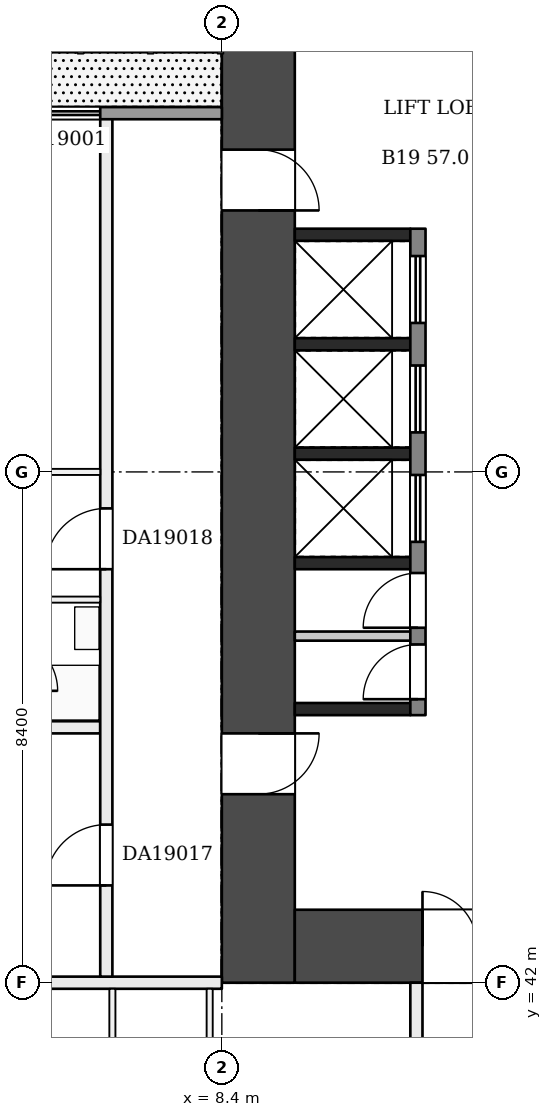
"""IFC4 building model, lengths in metres.
Left out: names, types, materials, properties, quantities, classifications, styles, units other than length and angle.
Written with IfcOpenShell. Run it as: python <this file> out.ifc"""

import sys

from ifc_helpers import new_model, si_unit, direction, frame, frame_2d, origin, place, context, subcontext, project, spatial, rectangle, extrude, element, fill, save


model = new_model("IFC4")
c1 = context("Model", 3, precision=1e-05, world=origin(), true_north=direction((0.0, 1.0)))
c2 = subcontext(c1, "Body", "Model", "MODEL_VIEW")
j1 = project(units=[si_unit("LENGTHUNIT", "METRE"), si_unit("PLANEANGLEUNIT", "RADIAN")], contexts=[c1])
p1 = place(None, origin())
s1 = spatial("IfcSite", under=j1, at=p1, CompositionType="ELEMENT")
p2 = place(p1, origin())
s2 = spatial("IfcBuilding", under=s1, at=p2, CompositionType="ELEMENT")
p3 = place(p2, frame((0.0, 0.0, 81.2)))
s3 = spatial("IfcBuildingStorey", under=s2, at=p3, CompositionType="ELEMENT", Elevation=81.2)
p4 = place(p3, frame((9.0, 58.8, 0.0), z_axis=(0.0, 0.0, 1.0), x_axis=(0.0, -1.0, 0.0)))
e1 = element("IfcWall", 1, at=p4, inside=s3, PredefinedType="SHEAR", context=c2, shape_type="SweptSolid", body=[
    extrude(rectangle(XDim=16.8, YDim=1.2, at=frame_2d((8.4, 0.0))), origin(), (0.0, 0.0, 1.0), 3.22),
])
p5 = place(p4, frame((3.1, 0.0, 0.0)))
e2 = element("IfcOpeningElement", 2, at=p5, cuts=e1, PredefinedType="OPENING", context=c2, shape_type="SweptSolid", body=[
    extrude(rectangle(XDim=1.0, YDim=2.1, at=frame_2d((0.5, 1.05))), frame((0.0, 0.61, 0.0), z_axis=(0.0, -1.0, 0.0), x_axis=(1.0, 0.0, 0.0)), (0.0, 0.0, 1.0), 1.22),
])
p6 = place(p4, frame((12.7, 0.0, 0.0)))
e3 = element("IfcOpeningElement", 3, at=p6, cuts=e1, PredefinedType="OPENING", context=c2, shape_type="SweptSolid", body=[
    extrude(rectangle(XDim=1.0, YDim=2.1, at=frame_2d((0.5, 1.05))), frame((0.0, 0.61, 0.0), z_axis=(0.0, -1.0, 0.0), x_axis=(1.0, 0.0, 0.0)), (0.0, 0.0, 1.0), 1.22),
])
p7 = place(p3, frame((9.6, 42.6, 0.0), z_axis=(0.0, 0.0, 1.0), x_axis=(1.0, 0.0, 0.0)))
e4 = element("IfcWall", 4, at=p7, inside=s3, PredefinedType="SHEAR", context=c2, shape_type="SweptSolid", body=[
    extrude(rectangle(XDim=14.4, YDim=1.2, at=frame_2d((7.2, 0.0))), origin(), (0.0, 0.0, 1.0), 3.22),
])
p8 = place(p7, frame((2.1, 0.0, 0.0)))
e5 = element("IfcOpeningElement", 5, at=p8, cuts=e4, PredefinedType="OPENING", context=c2, shape_type="SweptSolid", body=[
    extrude(rectangle(XDim=1.8, YDim=2.1, at=frame_2d((0.9, 1.05))), frame((0.0, 0.61, 0.0), z_axis=(0.0, -1.0, 0.0), x_axis=(1.0, 0.0, 0.0)), (0.0, 0.0, 1.0), 1.22),
])
for number, where, z_axis, x_axis in (
    (6, (9.6, 54.3, 0.0), (0.0, 0.0, 1.0), (1.0, 0.0, 0.0)),
    (7, (9.6, 52.5, 0.0), (0.0, 0.0, 1.0), (1.0, 0.0, 0.0)),
    (8, (9.6, 50.7, 0.0), (0.0, 0.0, 1.0), (1.0, 0.0, 0.0)),
    (9, (9.6, 48.9, 0.0), (0.0, 0.0, 1.0), (1.0, 0.0, 0.0)),
    (10, (9.6, 46.5, 0.0), (0.0, 0.0, 1.0), (1.0, 0.0, 0.0)),
):
    element("IfcWall", number, at=place(p3, frame(where, z_axis=z_axis, x_axis=x_axis)), inside=s3, PredefinedType="SHEAR", context=c2, shape_type="SweptSolid", body=[
        extrude(rectangle(XDim=1.9, YDim=0.2, at=frame_2d((0.95, 0.0))), origin(), (0.0, 0.0, 1.0), 3.22),
    ])
p9 = place(p3, frame((9.6, 47.7, 0.0), z_axis=(0.0, 0.0, 1.0), x_axis=(1.0, 0.0, 0.0)))
e11 = element("IfcWall", 11, at=p9, inside=s3, PredefinedType="PARTITIONING", context=c2, shape_type="SweptSolid", body=[
    extrude(rectangle(XDim=1.9, YDim=0.15, at=frame_2d((0.95, 0.0))), origin(), (0.0, 0.0, 1.0), 3.22),
])
p10 = place(p3, frame((11.625, 54.4, 0.0), z_axis=(0.0, 0.0, 1.0), x_axis=(0.0, -1.0, 0.0)))
e12 = element("IfcWall", 12, at=p10, inside=s3, PredefinedType="SHEAR", context=c2, shape_type="SweptSolid", body=[
    extrude(rectangle(XDim=8.0, YDim=0.25, at=frame_2d((4.0, 0.0))), origin(), (0.0, 0.0, 1.0), 3.22),
])
p11 = place(p10, frame((0.45, 0.0, 0.0)))
e13 = element("IfcOpeningElement", 13, at=p11, cuts=e12, PredefinedType="OPENING", context=c2, shape_type="SweptSolid", body=[
    extrude(rectangle(XDim=1.1, YDim=2.1, at=frame_2d((0.55, 1.05))), frame((0.0, 0.135, 0.0), z_axis=(0.0, -1.0, 0.0), x_axis=(1.0, 0.0, 0.0)), (0.0, 0.0, 1.0), 0.27),
])
p12 = place(p10, frame((2.25, 0.0, 0.0)))
e14 = element("IfcOpeningElement", 14, at=p12, cuts=e12, PredefinedType="OPENING", context=c2, shape_type="SweptSolid", body=[
    extrude(rectangle(XDim=1.1, YDim=2.1, at=frame_2d((0.55, 1.05))), frame((0.0, 0.135, 0.0), z_axis=(0.0, -1.0, 0.0), x_axis=(1.0, 0.0, 0.0)), (0.0, 0.0, 1.0), 0.27),
])
p13 = place(p10, frame((4.05, 0.0, 0.0)))
e15 = element("IfcOpeningElement", 15, at=p13, cuts=e12, PredefinedType="OPENING", context=c2, shape_type="SweptSolid", body=[
    extrude(rectangle(XDim=1.1, YDim=2.1, at=frame_2d((0.55, 1.05))), frame((0.0, 0.135, 0.0), z_axis=(0.0, -1.0, 0.0), x_axis=(1.0, 0.0, 0.0)), (0.0, 0.0, 1.0), 0.27),
])
p14 = place(p10, frame((5.663, 0.0, 0.0)))
e16 = element("IfcOpeningElement", 16, at=p14, cuts=e12, PredefinedType="OPENING", context=c2, shape_type="SweptSolid", body=[
    extrude(rectangle(XDim=0.9, YDim=2.1, at=frame_2d((0.45, 1.05))), frame((0.0, 0.135, 0.0), z_axis=(0.0, -1.0, 0.0), x_axis=(1.0, 0.0, 0.0)), (0.0, 0.0, 1.0), 0.27),
])
p15 = place(p10, frame((6.837, 0.0, 0.0)))
e17 = element("IfcOpeningElement", 17, at=p15, cuts=e12, PredefinedType="OPENING", context=c2, shape_type="SweptSolid", body=[
    extrude(rectangle(XDim=0.9, YDim=2.1, at=frame_2d((0.45, 1.05))), frame((0.0, 0.135, 0.0), z_axis=(0.0, -1.0, 0.0), x_axis=(1.0, 0.0, 0.0)), (0.0, 0.0, 1.0), 0.27),
])
p16 = place(p3, frame((2.5, 42.0, 0.0), z_axis=(0.0, 0.0, 1.0), x_axis=(1.0, 0.0, 0.0)))
e18 = element("IfcWall", 18, at=p16, inside=s3, PredefinedType="PARTITIONING", context=c2, shape_type="SweptSolid", body=[
    extrude(rectangle(XDim=5.9, YDim=0.2, at=frame_2d((2.95, 0.0))), origin(), (0.0, 0.0, 1.0), 3.22),
])
p17 = place(p3, frame((2.5, 46.2, 0.0), z_axis=(0.0, 0.0, 1.0), x_axis=(1.0, 0.0, 0.0)))
e19 = element("IfcWall", 19, at=p17, inside=s3, PredefinedType="PARTITIONING", context=c2, shape_type="SweptSolid", body=[
    extrude(rectangle(XDim=3.9, YDim=0.2, at=frame_2d((1.95, 0.0))), origin(), (0.0, 0.0, 1.0), 3.22),
])
p18 = place(p3, frame((4.85, 48.3, 0.0), z_axis=(0.0, 0.0, 1.0), x_axis=(1.0, 0.0, 0.0)))
e20 = element("IfcWall", 20, at=p18, inside=s3, PredefinedType="PARTITIONING", context=c2, shape_type="SweptSolid", body=[
    extrude(rectangle(XDim=1.55, YDim=0.1, at=frame_2d((0.775, 0.0))), origin(), (0.0, 0.0, 1.0), 3.22),
])
p19 = place(p3, frame((2.5, 50.4, 0.0), z_axis=(0.0, 0.0, 1.0), x_axis=(1.0, 0.0, 0.0)))
e21 = element("IfcWall", 21, at=p19, inside=s3, PredefinedType="PARTITIONING", context=c2, shape_type="SweptSolid", body=[
    extrude(rectangle(XDim=3.9, YDim=0.1, at=frame_2d((1.95, 0.0))), origin(), (0.0, 0.0, 1.0), 3.22),
])
p20 = place(p19, frame((0.6, 0.0, 0.0)))
e22 = element("IfcOpeningElement", 22, at=p20, cuts=e21, PredefinedType="OPENING", context=c2, shape_type="SweptSolid", body=[
    extrude(rectangle(XDim=0.9, YDim=2.1, at=frame_2d((0.45, 1.05))), frame((0.0, 0.06, 0.0), z_axis=(0.0, -1.0, 0.0), x_axis=(1.0, 0.0, 0.0)), (0.0, 0.0, 1.0), 0.12),
])
p21 = place(p3, frame((6.5, 42.1, 0.0), z_axis=(0.0, 0.0, 1.0), x_axis=(0.0, 1.0, 0.0)))
e23 = element("IfcWall", 23, at=p21, inside=s3, PredefinedType="PARTITIONING", context=c2, shape_type="SweptSolid", body=[
    extrude(rectangle(XDim=14.2, YDim=0.2, at=frame_2d((7.1, 0.0))), origin(), (0.0, 0.0, 1.0), 3.22),
])
p22 = place(p21, frame((1.5, 0.0, 0.0)))
e24 = element("IfcOpeningElement", 24, at=p22, cuts=e23, PredefinedType="OPENING", context=c2, shape_type="SweptSolid", body=[
    extrude(rectangle(XDim=1.0, YDim=2.1, at=frame_2d((0.5, 1.05))), frame((0.0, 0.11, 0.0), z_axis=(0.0, -1.0, 0.0), x_axis=(1.0, 0.0, 0.0)), (0.0, 0.0, 1.0), 0.22),
])
p23 = place(p21, frame((6.7, 0.0, 0.0)))
e25 = element("IfcOpeningElement", 25, at=p23, cuts=e23, PredefinedType="OPENING", context=c2, shape_type="SweptSolid", body=[
    extrude(rectangle(XDim=1.0, YDim=2.1, at=frame_2d((0.5, 1.05))), frame((0.0, 0.11, 0.0), z_axis=(0.0, -1.0, 0.0), x_axis=(1.0, 0.0, 0.0)), (0.0, 0.0, 1.0), 0.22),
])
p24 = place(p3, frame((6.6, 16.85, 0.0), z_axis=(0.0, 0.0, 1.0), x_axis=(0.0, 1.0, 0.0)))
e26 = element("IfcWall", 26, at=p24, inside=s3, PredefinedType="PARTITIONING", context=c2, shape_type="SweptSolid", body=[
    extrude(rectangle(XDim=25.05, YDim=0.1, at=frame_2d((12.525, 0.0))), origin(), (0.0, 0.0, 1.0), 3.22),
])
p25 = place(p24, frame((1.55, 0.0, 0.0)))
e27 = element("IfcOpeningElement", 27, at=p25, cuts=e26, PredefinedType="OPENING", context=c2, shape_type="SweptSolid", body=[
    extrude(rectangle(XDim=0.9, YDim=2.1, at=frame_2d((0.45, 1.05))), frame((0.0, 0.06, 0.0), z_axis=(0.0, -1.0, 0.0), x_axis=(1.0, 0.0, 0.0)), (0.0, 0.0, 1.0), 0.12),
])
p26 = place(p24, frame((5.75, 0.0, 0.0)))
e28 = element("IfcOpeningElement", 28, at=p26, cuts=e26, PredefinedType="OPENING", context=c2, shape_type="SweptSolid", body=[
    extrude(rectangle(XDim=0.9, YDim=2.1, at=frame_2d((0.45, 1.05))), frame((0.0, 0.06, 0.0), z_axis=(0.0, -1.0, 0.0), x_axis=(1.0, 0.0, 0.0)), (0.0, 0.0, 1.0), 0.12),
])
p27 = place(p24, frame((9.95, 0.0, 0.0)))
e29 = element("IfcOpeningElement", 29, at=p27, cuts=e26, PredefinedType="OPENING", context=c2, shape_type="SweptSolid", body=[
    extrude(rectangle(XDim=0.9, YDim=2.1, at=frame_2d((0.45, 1.05))), frame((0.0, 0.06, 0.0), z_axis=(0.0, -1.0, 0.0), x_axis=(1.0, 0.0, 0.0)), (0.0, 0.0, 1.0), 0.12),
])
p28 = place(p24, frame((14.15, 0.0, 0.0)))
e30 = element("IfcOpeningElement", 30, at=p28, cuts=e26, PredefinedType="OPENING", context=c2, shape_type="SweptSolid", body=[
    extrude(rectangle(XDim=0.9, YDim=2.1, at=frame_2d((0.45, 1.05))), frame((0.0, 0.06, 0.0), z_axis=(0.0, -1.0, 0.0), x_axis=(1.0, 0.0, 0.0)), (0.0, 0.0, 1.0), 0.12),
])
p29 = place(p24, frame((20.45, 0.0, 0.0)))
e31 = element("IfcOpeningElement", 31, at=p29, cuts=e26, PredefinedType="OPENING", context=c2, shape_type="SweptSolid", body=[
    extrude(rectangle(XDim=0.9, YDim=2.1, at=frame_2d((0.45, 1.05))), frame((0.0, 0.06, 0.0), z_axis=(0.0, -1.0, 0.0), x_axis=(1.0, 0.0, 0.0)), (0.0, 0.0, 1.0), 0.12),
])
p30 = place(p3, frame((8.2, 21.0, 0.0), z_axis=(0.0, 0.0, 1.0), x_axis=(0.0, 1.0, 0.0)))
e32 = element("IfcWall", 32, at=p30, inside=s3, PredefinedType="PARTITIONING", context=c2, shape_type="SweptSolid", body=[
    extrude(rectangle(XDim=20.9, YDim=0.1, at=frame_2d((10.45, 0.0))), origin(), (0.0, 0.0, 1.0), 3.22),
])
p31 = place(p30, frame((5.88, 0.0, 0.0)))
e33 = element("IfcOpeningElement", 33, at=p31, cuts=e32, PredefinedType="OPENING", context=c2, shape_type="SweptSolid", body=[
    extrude(rectangle(XDim=0.9, YDim=2.1, at=frame_2d((0.45, 1.05))), frame((0.0, 0.06, 0.0), z_axis=(0.0, -1.0, 0.0), x_axis=(1.0, 0.0, 0.0)), (0.0, 0.0, 1.0), 0.12),
])
p32 = place(p30, frame((1.6, 0.0, 0.0)))
e34 = element("IfcOpeningElement", 34, at=p32, cuts=e32, PredefinedType="OPENING", context=c2, shape_type="SweptSolid", body=[
    extrude(rectangle(XDim=0.9, YDim=2.1, at=frame_2d((0.45, 1.05))), frame((0.0, 0.06, 0.0), z_axis=(0.0, -1.0, 0.0), x_axis=(1.0, 0.0, 0.0)), (0.0, 0.0, 1.0), 0.12),
])
p33 = place(p30, frame((10.16, 0.0, 0.0)))
e35 = element("IfcOpeningElement", 35, at=p33, cuts=e32, PredefinedType="OPENING", context=c2, shape_type="SweptSolid", body=[
    extrude(rectangle(XDim=0.9, YDim=2.1, at=frame_2d((0.45, 1.05))), frame((0.0, 0.06, 0.0), z_axis=(0.0, -1.0, 0.0), x_axis=(1.0, 0.0, 0.0)), (0.0, 0.0, 1.0), 0.12),
])
p34 = place(p30, frame((14.69, 0.0, 0.0)))
e36 = element("IfcOpeningElement", 36, at=p34, cuts=e32, PredefinedType="OPENING", context=c2, shape_type="SweptSolid", body=[
    extrude(rectangle(XDim=0.9, YDim=2.1, at=frame_2d((0.45, 1.05))), frame((0.0, 0.06, 0.0), z_axis=(0.0, -1.0, 0.0), x_axis=(1.0, 0.0, 0.0)), (0.0, 0.0, 1.0), 0.12),
])
p35 = place(p30, frame((18.87, 0.0, 0.0)))
e37 = element("IfcOpeningElement", 37, at=p35, cuts=e32, PredefinedType="OPENING", context=c2, shape_type="SweptSolid", body=[
    extrude(rectangle(XDim=0.9, YDim=2.1, at=frame_2d((0.45, 1.05))), frame((0.0, 0.06, 0.0), z_axis=(0.0, -1.0, 0.0), x_axis=(1.0, 0.0, 0.0)), (0.0, 0.0, 1.0), 0.12),
])
p36 = place(p3, frame((11.6, 10.9, 0.0), z_axis=(0.0, 0.0, 1.0), x_axis=(0.0, 1.0, 0.0)))
e38 = element("IfcWall", 38, at=p36, inside=s3, PredefinedType="PARTITIONING", context=c2, shape_type="SweptSolid", body=[
    extrude(rectangle(XDim=31.1, YDim=0.2, at=frame_2d((15.55, 0.0))), origin(), (0.0, 0.0, 1.0), 3.22),
])
p37 = place(p36, frame((8.5, 0.0, 0.0)))
e39 = element("IfcOpeningElement", 39, at=p37, cuts=e38, PredefinedType="OPENING", context=c2, shape_type="SweptSolid", body=[
    extrude(rectangle(XDim=1.0, YDim=2.1, at=frame_2d((0.5, 1.05))), frame((0.0, 0.11, 0.0), z_axis=(0.0, -1.0, 0.0), x_axis=(1.0, 0.0, 0.0)), (0.0, 0.0, 1.0), 0.22),
])
p38 = place(p36, frame((15.98, 0.0, 0.0)))
e40 = element("IfcOpeningElement", 40, at=p38, cuts=e38, PredefinedType="OPENING", context=c2, shape_type="SweptSolid", body=[
    extrude(rectangle(XDim=1.0, YDim=2.1, at=frame_2d((0.5, 1.05))), frame((0.0, 0.11, 0.0), z_axis=(0.0, -1.0, 0.0), x_axis=(1.0, 0.0, 0.0)), (0.0, 0.0, 1.0), 0.22),
])
p39 = place(p3, frame((8.4, 56.3, 0.0), z_axis=(0.0, 0.0, 1.0), x_axis=(-1.0, 0.0, 0.0)))
e41 = element("IfcWall", 41, at=p39, inside=s3, PredefinedType="SOLIDWALL", context=c2, shape_type="SweptSolid", body=[
    extrude(rectangle(XDim=3.6, YDim=0.2, at=frame_2d((1.8, 0.0))), origin(), (0.0, 0.0, 1.0), 3.22),
])
p40 = place(p39, frame((2.0, 0.0, 0.0)))
e42 = element("IfcOpeningElement", 42, at=p40, cuts=e41, PredefinedType="OPENING", context=c2, shape_type="SweptSolid", body=[
    extrude(rectangle(XDim=1.3, YDim=2.2, at=frame_2d((0.65, 1.1))), frame((0.0, 0.11, 0.0), z_axis=(0.0, -1.0, 0.0), x_axis=(1.0, 0.0, 0.0)), (0.0, 0.0, 1.0), 0.22),
])
p41 = place(p5, origin())
e43 = element("IfcDoor", 43, at=p41, inside=s3, OperationType="SINGLE_SWING_RIGHT", PredefinedType="DOOR", context=c2, shape_type="SweptSolid", body=[
    extrude(rectangle(XDim=1.0, YDim=2.1, at=frame_2d((0.5, 1.05))), frame((0.0, 0.025, 0.0), z_axis=(0.0, -1.0, 0.0), x_axis=(1.0, 0.0, 0.0)), (0.0, 0.0, 1.0), 0.05),
])
fill(e2, e43)
p42 = place(p6, origin())
e44 = element("IfcDoor", 44, at=p42, inside=s3, OperationType="SINGLE_SWING_LEFT", PredefinedType="DOOR", context=c2, shape_type="SweptSolid", body=[
    extrude(rectangle(XDim=1.0, YDim=2.1, at=frame_2d((0.5, 1.05))), frame((0.0, 0.025, 0.0), z_axis=(0.0, -1.0, 0.0), x_axis=(1.0, 0.0, 0.0)), (0.0, 0.0, 1.0), 0.05),
])
fill(e3, e44)
p43 = place(p8, origin())
e45 = element("IfcDoor", 45, at=p43, inside=s3, OperationType="DOUBLE_DOOR_SINGLE_SWING", PredefinedType="DOOR", context=c2, shape_type="SweptSolid", body=[
    extrude(rectangle(XDim=1.8, YDim=2.1, at=frame_2d((0.9, 1.05))), frame((0.0, 0.025, 0.0), z_axis=(0.0, -1.0, 0.0), x_axis=(1.0, 0.0, 0.0)), (0.0, 0.0, 1.0), 0.05),
])
fill(e5, e45)
p44 = place(p11, origin())
e46 = element("IfcDoor", 46, at=p44, inside=s3, OperationType="DOUBLE_DOOR_SLIDING", PredefinedType="DOOR", context=c2, shape_type="SweptSolid", body=[
    extrude(rectangle(XDim=1.1, YDim=2.1, at=frame_2d((0.55, 1.05))), frame((0.0, 0.025, 0.0), z_axis=(0.0, -1.0, 0.0), x_axis=(1.0, 0.0, 0.0)), (0.0, 0.0, 1.0), 0.05),
])
fill(e13, e46)
p45 = place(p12, origin())
e47 = element("IfcDoor", 47, at=p45, inside=s3, OperationType="DOUBLE_DOOR_SLIDING", PredefinedType="DOOR", context=c2, shape_type="SweptSolid", body=[
    extrude(rectangle(XDim=1.1, YDim=2.1, at=frame_2d((0.55, 1.05))), frame((0.0, 0.025, 0.0), z_axis=(0.0, -1.0, 0.0), x_axis=(1.0, 0.0, 0.0)), (0.0, 0.0, 1.0), 0.05),
])
fill(e14, e47)
p46 = place(p13, origin())
e48 = element("IfcDoor", 48, at=p46, inside=s3, OperationType="DOUBLE_DOOR_SLIDING", PredefinedType="DOOR", context=c2, shape_type="SweptSolid", body=[
    extrude(rectangle(XDim=1.1, YDim=2.1, at=frame_2d((0.55, 1.05))), frame((0.0, 0.025, 0.0), z_axis=(0.0, -1.0, 0.0), x_axis=(1.0, 0.0, 0.0)), (0.0, 0.0, 1.0), 0.05),
])
fill(e15, e48)
p47 = place(p14, frame((0.9, 0.0, 0.0), z_axis=(0.0, 0.0, 1.0), x_axis=(-1.0, 0.0, 0.0)))
e49 = element("IfcDoor", 49, at=p47, inside=s3, OperationType="SINGLE_SWING_LEFT", PredefinedType="DOOR", context=c2, shape_type="SweptSolid", body=[
    extrude(rectangle(XDim=0.9, YDim=2.1, at=frame_2d((0.45, 1.05))), frame((0.0, 0.025, 0.0), z_axis=(0.0, -1.0, 0.0), x_axis=(1.0, 0.0, 0.0)), (0.0, 0.0, 1.0), 0.05),
])
fill(e16, e49)
p48 = place(p15, frame((0.9, 0.0, 0.0), z_axis=(0.0, 0.0, 1.0), x_axis=(-1.0, 0.0, 0.0)))
e50 = element("IfcDoor", 50, at=p48, inside=s3, OperationType="SINGLE_SWING_LEFT", PredefinedType="DOOR", context=c2, shape_type="SweptSolid", body=[
    extrude(rectangle(XDim=0.9, YDim=2.1, at=frame_2d((0.45, 1.05))), frame((0.0, 0.025, 0.0), z_axis=(0.0, -1.0, 0.0), x_axis=(1.0, 0.0, 0.0)), (0.0, 0.0, 1.0), 0.05),
])
fill(e17, e50)
p49 = place(p22, origin())
e51 = element("IfcDoor", 51, at=p49, inside=s3, OperationType="SINGLE_SWING_LEFT", PredefinedType="DOOR", context=c2, shape_type="SweptSolid", body=[
    extrude(rectangle(XDim=1.0, YDim=2.1, at=frame_2d((0.5, 1.05))), frame((0.0, 0.025, 0.0), z_axis=(0.0, -1.0, 0.0), x_axis=(1.0, 0.0, 0.0)), (0.0, 0.0, 1.0), 0.05),
])
fill(e24, e51)
p50 = place(p23, origin())
e52 = element("IfcDoor", 52, at=p50, inside=s3, OperationType="SINGLE_SWING_LEFT", PredefinedType="DOOR", context=c2, shape_type="SweptSolid", body=[
    extrude(rectangle(XDim=1.0, YDim=2.1, at=frame_2d((0.5, 1.05))), frame((0.0, 0.025, 0.0), z_axis=(0.0, -1.0, 0.0), x_axis=(1.0, 0.0, 0.0)), (0.0, 0.0, 1.0), 0.05),
])
fill(e25, e52)
p51 = place(p40, origin())
e53 = element("IfcDoor", 53, at=p51, inside=s3, OperationType="DOUBLE_DOOR_SLIDING", PredefinedType="DOOR", context=c2, shape_type="SweptSolid", body=[
    extrude(rectangle(XDim=1.3, YDim=2.2, at=frame_2d((0.65, 1.1))), frame((0.0, 0.025, 0.0), z_axis=(0.0, -1.0, 0.0), x_axis=(1.0, 0.0, 0.0)), (0.0, 0.0, 1.0), 0.05),
])
fill(e42, e53)
save(model, sys.argv[1])
